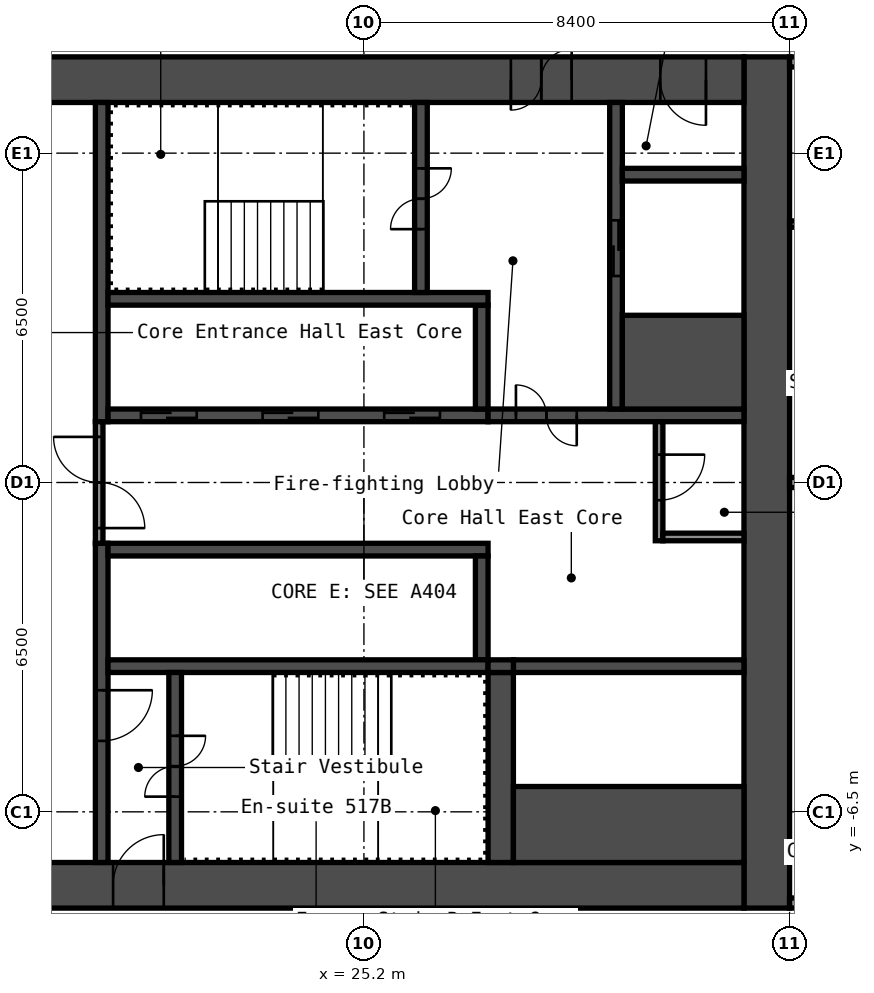
"""IFC4 building model, lengths in metres.
Left out: names, types, materials, properties, quantities, classifications, styles, units other than length and angle.
Written with IfcOpenShell. Run it as: python <this file> out.ifc"""

import sys

from ifc_helpers import new_model, si_unit, direction, frame, frame_2d, origin, place, context, subcontext, project, spatial, rectangle, extrude, element, fill, save


model = new_model("IFC4")
c1 = context("Model", 3, precision=1e-05, world=origin(), true_north=direction((0.0, 1.0)))
c2 = subcontext(c1, "Body", "Model", "MODEL_VIEW")
j1 = project(units=[si_unit("LENGTHUNIT", "METRE"), si_unit("PLANEANGLEUNIT", "RADIAN")], contexts=[c1])
p1 = place(None, origin())
s1 = spatial("IfcSite", under=j1, at=p1, CompositionType="ELEMENT")
p2 = place(p1, origin())
s2 = spatial("IfcBuilding", under=s1, at=p2, CompositionType="ELEMENT")
p3 = place(p2, frame((0.0, 0.0, 23.0)))
s3 = spatial("IfcBuildingStorey", under=s2, at=p3, CompositionType="ELEMENT", Elevation=23.0)
p4 = place(p3, frame((33.15, -8.4, 0.0), z_axis=(0.0, 0.0, 1.0), x_axis=(0.0, 1.0, 0.0)))
e1 = element("IfcWall", 1, at=p4, inside=s3, PredefinedType="SHEAR", context=c2, shape_type="SweptSolid", body=[
    extrude(rectangle(XDim=16.8, YDim=0.9, at=frame_2d((8.4, 0.0))), origin(), (0.0, 0.0, 1.0), 2.8),
])
p5 = place(p3, frame((17.7, 7.95, 0.0), z_axis=(0.0, 0.0, 1.0), x_axis=(1.0, 0.0, 0.0)))
e2 = element("IfcWall", 2, at=p5, inside=s3, PredefinedType="SHEAR", context=c2, shape_type="SweptSolid", body=[
    extrude(rectangle(XDim=15.0, YDim=0.9, at=frame_2d((7.5, 0.0))), origin(), (0.0, 0.0, 1.0), 2.8),
])
p6 = place(p5, frame((10.4, 0.0, 0.0)))
e3 = element("IfcOpeningElement", 3, at=p6, cuts=e2, PredefinedType="OPENING", context=c2, shape_type="SweptSolid", body=[
    extrude(rectangle(XDim=1.2, YDim=2.1, at=frame_2d((0.6, 1.05))), frame((0.0, 0.46, 0.0), z_axis=(0.0, -1.0, 0.0), x_axis=(1.0, 0.0, 0.0)), (0.0, 0.0, 1.0), 0.92),
])
p7 = place(p5, frame((13.35, 0.0, 0.0)))
e4 = element("IfcOpeningElement", 4, at=p7, cuts=e2, PredefinedType="OPENING", context=c2, shape_type="SweptSolid", body=[
    extrude(rectangle(XDim=0.9, YDim=2.1, at=frame_2d((0.45, 1.05))), frame((0.0, 0.46, 0.0), z_axis=(0.0, -1.0, 0.0), x_axis=(1.0, 0.0, 0.0)), (0.0, 0.0, 1.0), 0.92),
])
p8 = place(p3, frame((17.7, -7.95, 0.0), z_axis=(0.0, 0.0, 1.0), x_axis=(1.0, 0.0, 0.0)))
e5 = element("IfcWall", 5, at=p8, inside=s3, PredefinedType="SHEAR", context=c2, shape_type="SweptSolid", body=[
    extrude(rectangle(XDim=15.0, YDim=0.9, at=frame_2d((7.5, 0.0))), origin(), (0.0, 0.0, 1.0), 2.8),
])
p9 = place(p8, frame((2.55, 0.0, 0.0)))
e6 = element("IfcOpeningElement", 6, at=p9, cuts=e5, PredefinedType="OPENING", context=c2, shape_type="SweptSolid", body=[
    extrude(rectangle(XDim=1.0, YDim=2.1, at=frame_2d((0.5, 1.05))), frame((0.0, 0.46, 0.0), z_axis=(0.0, -1.0, 0.0), x_axis=(1.0, 0.0, 0.0)), (0.0, 0.0, 1.0), 0.92),
])
p10 = place(p3, frame((20.025, 1.2, 0.0), z_axis=(0.0, 0.0, 1.0), x_axis=(0.0, 1.0, 0.0)))
e7 = element("IfcWall", 7, at=p10, inside=s3, PredefinedType="SHEAR", context=c2, shape_type="SweptSolid", body=[
    extrude(rectangle(XDim=6.3, YDim=0.25, at=frame_2d((3.15, 0.0))), origin(), (0.0, 0.0, 1.0), 2.8),
])
p11 = place(p3, frame((20.025, -7.5, 0.0), z_axis=(0.0, 0.0, 1.0), x_axis=(0.0, 1.0, 0.0)))
e8 = element("IfcWall", 8, at=p11, inside=s3, PredefinedType="SHEAR", context=c2, shape_type="SweptSolid", body=[
    extrude(rectangle(XDim=6.3, YDim=0.25, at=frame_2d((3.15, 0.0))), origin(), (0.0, 0.0, 1.0), 2.8),
])
p12 = place(p11, frame((2.4, 0.0, 0.0)))
e9 = element("IfcOpeningElement", 9, at=p12, cuts=e8, PredefinedType="OPENING", context=c2, shape_type="SweptSolid", body=[
    extrude(rectangle(XDim=1.0, YDim=2.1, at=frame_2d((0.5, 1.05))), frame((0.0, 0.135, 0.0), z_axis=(0.0, -1.0, 0.0), x_axis=(1.0, 0.0, 0.0)), (0.0, 0.0, 1.0), 0.27),
])
p13 = place(p3, frame((20.15, 1.325, 0.0), z_axis=(0.0, 0.0, 1.0), x_axis=(1.0, 0.0, 0.0)))
e10 = element("IfcWall", 10, at=p13, inside=s3, PredefinedType="SHEAR", context=c2, shape_type="SweptSolid", body=[
    extrude(rectangle(XDim=7.5, YDim=0.25, at=frame_2d((3.75, 0.0))), origin(), (0.0, 0.0, 1.0), 2.8),
])
p14 = place(p13, frame((0.65, 0.0, 0.0)))
e11 = element("IfcOpeningElement", 11, at=p14, cuts=e10, PredefinedType="OPENING", context=c2, shape_type="SweptSolid", body=[
    extrude(rectangle(XDim=1.1, YDim=2.1, at=frame_2d((0.55, 1.05))), frame((0.0, 0.135, 0.0), z_axis=(0.0, -1.0, 0.0), x_axis=(1.0, 0.0, 0.0)), (0.0, 0.0, 1.0), 0.27),
])
p15 = place(p13, frame((3.05, 0.0, 0.0)))
e12 = element("IfcOpeningElement", 12, at=p15, cuts=e10, PredefinedType="OPENING", context=c2, shape_type="SweptSolid", body=[
    extrude(rectangle(XDim=1.1, YDim=2.1, at=frame_2d((0.55, 1.05))), frame((0.0, 0.135, 0.0), z_axis=(0.0, -1.0, 0.0), x_axis=(1.0, 0.0, 0.0)), (0.0, 0.0, 1.0), 0.27),
])
p16 = place(p13, frame((5.45, 0.0, 0.0)))
e13 = element("IfcOpeningElement", 13, at=p16, cuts=e10, PredefinedType="OPENING", context=c2, shape_type="SweptSolid", body=[
    extrude(rectangle(XDim=1.1, YDim=2.1, at=frame_2d((0.55, 1.05))), frame((0.0, 0.135, 0.0), z_axis=(0.0, -1.0, 0.0), x_axis=(1.0, 0.0, 0.0)), (0.0, 0.0, 1.0), 0.27),
])
p17 = place(p3, frame((27.525, 1.45, 0.0), z_axis=(0.0, 0.0, 1.0), x_axis=(0.0, 1.0, 0.0)))
e14 = element("IfcWall", 14, at=p17, inside=s3, PredefinedType="SHEAR", context=c2, shape_type="SweptSolid", body=[
    extrude(rectangle(XDim=2.05, YDim=0.25, at=frame_2d((1.025, 0.0))), origin(), (0.0, 0.0, 1.0), 2.8),
])
p18 = place(p3, frame((20.15, 3.625, 0.0), z_axis=(0.0, 0.0, 1.0), x_axis=(1.0, 0.0, 0.0)))
e15 = element("IfcWall", 15, at=p18, inside=s3, PredefinedType="SHEAR", context=c2, shape_type="SweptSolid", body=[
    extrude(rectangle(XDim=7.5, YDim=0.25, at=frame_2d((3.75, 0.0))), origin(), (0.0, 0.0, 1.0), 2.8),
])
p19 = place(p3, frame((26.325, 3.75, 0.0), z_axis=(0.0, 0.0, 1.0), x_axis=(0.0, 1.0, 0.0)))
e16 = element("IfcWall", 16, at=p19, inside=s3, PredefinedType="SHEAR", context=c2, shape_type="SweptSolid", body=[
    extrude(rectangle(XDim=3.75, YDim=0.25, at=frame_2d((1.875, 0.0))), origin(), (0.0, 0.0, 1.0), 2.8),
])
p20 = place(p19, frame((1.25, 0.0, 0.0)))
e17 = element("IfcOpeningElement", 17, at=p20, cuts=e16, PredefinedType="OPENING", context=c2, shape_type="SweptSolid", body=[
    extrude(rectangle(XDim=1.2, YDim=2.1, at=frame_2d((0.6, 1.05))), frame((0.0, 0.135, 0.0), z_axis=(0.0, -1.0, 0.0), x_axis=(1.0, 0.0, 0.0)), (0.0, 0.0, 1.0), 0.27),
])
p21 = place(p3, frame((27.65, 1.325, 0.0), z_axis=(0.0, 0.0, 1.0), x_axis=(1.0, 0.0, 0.0)))
e18 = element("IfcWall", 18, at=p21, inside=s3, PredefinedType="SHEAR", context=c2, shape_type="SweptSolid", body=[
    extrude(rectangle(XDim=5.05, YDim=0.25, at=frame_2d((2.525, 0.0))), origin(), (0.0, 0.0, 1.0), 2.8),
])
p22 = place(p21, frame((0.55, 0.0, 0.0)))
e19 = element("IfcOpeningElement", 19, at=p22, cuts=e18, PredefinedType="OPENING", context=c2, shape_type="SweptSolid", body=[
    extrude(rectangle(XDim=1.2, YDim=2.1, at=frame_2d((0.6, 1.05))), frame((0.0, 0.135, 0.0), z_axis=(0.0, -1.0, 0.0), x_axis=(1.0, 0.0, 0.0)), (0.0, 0.0, 1.0), 0.27),
])
p23 = place(p3, frame((30.175, 1.45, 0.0), z_axis=(0.0, 0.0, 1.0), x_axis=(0.0, 1.0, 0.0)))
e20 = element("IfcWall", 20, at=p23, inside=s3, PredefinedType="SHEAR", context=c2, shape_type="SweptSolid", body=[
    extrude(rectangle(XDim=6.05, YDim=0.25, at=frame_2d((3.025, 0.0))), origin(), (0.0, 0.0, 1.0), 2.8),
])
p24 = place(p23, frame((2.625, 0.0, 0.0)))
e21 = element("IfcOpeningElement", 21, at=p24, cuts=e20, PredefinedType="OPENING", context=c2, shape_type="SweptSolid", body=[
    extrude(rectangle(XDim=1.1, YDim=2.1, at=frame_2d((0.55, 1.05))), frame((0.0, 0.135, 0.0), z_axis=(0.0, -1.0, 0.0), x_axis=(1.0, 0.0, 0.0)), (0.0, 0.0, 1.0), 0.27),
])
p25 = place(p3, frame((30.3, 2.375, 0.0), z_axis=(0.0, 0.0, 1.0), x_axis=(1.0, 0.0, 0.0)))
e22 = element("IfcWall", 22, at=p25, inside=s3, PredefinedType="SHEAR", context=c2, shape_type="SweptSolid", body=[
    extrude(rectangle(XDim=2.4, YDim=1.85, at=frame_2d((1.2, 0.0))), origin(), (0.0, 0.0, 1.0), 2.8),
])
p26 = place(p3, frame((30.3, 6.075, 0.0), z_axis=(0.0, 0.0, 1.0), x_axis=(1.0, 0.0, 0.0)))
e23 = element("IfcWall", 23, at=p26, inside=s3, PredefinedType="SHEAR", context=c2, shape_type="SweptSolid", body=[
    extrude(rectangle(XDim=2.4, YDim=0.25, at=frame_2d((1.2, 0.0))), origin(), (0.0, 0.0, 1.0), 2.8),
])
p27 = place(p3, frame((20.15, -1.325, 0.0), z_axis=(0.0, 0.0, 1.0), x_axis=(1.0, 0.0, 0.0)))
e24 = element("IfcWall", 24, at=p27, inside=s3, PredefinedType="SHEAR", context=c2, shape_type="SweptSolid", body=[
    extrude(rectangle(XDim=7.5, YDim=0.25, at=frame_2d((3.75, 0.0))), origin(), (0.0, 0.0, 1.0), 2.8),
])
p28 = place(p3, frame((27.525, -3.5, 0.0), z_axis=(0.0, 0.0, 1.0), x_axis=(0.0, 1.0, 0.0)))
e25 = element("IfcWall", 25, at=p28, inside=s3, PredefinedType="SHEAR", context=c2, shape_type="SweptSolid", body=[
    extrude(rectangle(XDim=2.05, YDim=0.25, at=frame_2d((1.025, 0.0))), origin(), (0.0, 0.0, 1.0), 2.8),
])
p29 = place(p3, frame((20.15, -3.625, 0.0), z_axis=(0.0, 0.0, 1.0), x_axis=(1.0, 0.0, 0.0)))
e26 = element("IfcWall", 26, at=p29, inside=s3, PredefinedType="SHEAR", context=c2, shape_type="SweptSolid", body=[
    extrude(rectangle(XDim=7.5, YDim=0.25, at=frame_2d((3.75, 0.0))), origin(), (0.0, 0.0, 1.0), 2.8),
])
p30 = place(p3, frame((21.475, -7.5, 0.0), z_axis=(0.0, 0.0, 1.0), x_axis=(0.0, 1.0, 0.0)))
e27 = element("IfcWall", 27, at=p30, inside=s3, PredefinedType="SHEAR", context=c2, shape_type="SweptSolid", body=[
    extrude(rectangle(XDim=3.75, YDim=0.25, at=frame_2d((1.875, 0.0))), origin(), (0.0, 0.0, 1.0), 2.8),
])
p31 = place(p30, frame((1.3, 0.0, 0.0)))
e28 = element("IfcOpeningElement", 28, at=p31, cuts=e27, PredefinedType="OPENING", context=c2, shape_type="SweptSolid", body=[
    extrude(rectangle(XDim=1.2, YDim=2.1, at=frame_2d((0.6, 1.05))), frame((0.0, 0.135, 0.0), z_axis=(0.0, -1.0, 0.0), x_axis=(1.0, 0.0, 0.0)), (0.0, 0.0, 1.0), 0.27),
])
p32 = place(p3, frame((27.9, -7.5, 0.0), z_axis=(0.0, 0.0, 1.0), x_axis=(0.0, 1.0, 0.0)))
e29 = element("IfcWall", 29, at=p32, inside=s3, PredefinedType="SHEAR", context=c2, shape_type="SweptSolid", body=[
    extrude(rectangle(XDim=3.75, YDim=0.5, at=frame_2d((1.875, 0.0))), origin(), (0.0, 0.0, 1.0), 2.8),
])
p33 = place(p3, frame((28.15, -3.625, 0.0), z_axis=(0.0, 0.0, 1.0), x_axis=(1.0, 0.0, 0.0)))
e30 = element("IfcWall", 30, at=p33, inside=s3, PredefinedType="SHEAR", context=c2, shape_type="SweptSolid", body=[
    extrude(rectangle(XDim=4.55, YDim=0.25, at=frame_2d((2.275, 0.0))), origin(), (0.0, 0.0, 1.0), 2.8),
])
p34 = place(p3, frame((28.15, -6.75, 0.0), z_axis=(0.0, 0.0, 1.0), x_axis=(1.0, 0.0, 0.0)))
e31 = element("IfcWall", 31, at=p34, inside=s3, PredefinedType="SHEAR", context=c2, shape_type="SweptSolid", body=[
    extrude(rectangle(XDim=4.55, YDim=1.5, at=frame_2d((2.275, 0.0))), origin(), (0.0, 0.0, 1.0), 2.8),
])
p35 = place(p3, frame((27.65, -3.625, 0.0), z_axis=(0.0, 0.0, 1.0), x_axis=(1.0, 0.0, 0.0)))
e32 = element("IfcWall", 32, at=p35, inside=s3, PredefinedType="SHEAR", context=c2, shape_type="SweptSolid", body=[
    extrude(rectangle(XDim=0.5, YDim=0.25, at=frame_2d((0.25, 0.0))), origin(), (0.0, 0.0, 1.0), 2.8),
])
p36 = place(p3, frame((19.975, -1.2, 0.0), z_axis=(0.0, 0.0, 1.0), x_axis=(0.0, 1.0, 0.0)))
e33 = element("IfcWall", 33, at=p36, inside=s3, PredefinedType="PARTITIONING", context=c2, shape_type="SweptSolid", body=[
    extrude(rectangle(XDim=2.4, YDim=0.15, at=frame_2d((1.2, 0.0))), origin(), (0.0, 0.0, 1.0), 2.8),
])
p37 = place(p36, frame((0.3, 0.0, 0.0)))
e34 = element("IfcOpeningElement", 34, at=p37, cuts=e33, PredefinedType="OPENING", context=c2, shape_type="SweptSolid", body=[
    extrude(rectangle(XDim=1.8, YDim=2.1, at=frame_2d((0.9, 1.05))), frame((0.0, 0.085, 0.0), z_axis=(0.0, -1.0, 0.0), x_axis=(1.0, 0.0, 0.0)), (0.0, 0.0, 1.0), 0.17),
])
p38 = place(p3, frame((31.025, -1.15, 0.0), z_axis=(0.0, 0.0, 1.0), x_axis=(0.0, 1.0, 0.0)))
e35 = element("IfcWall", 35, at=p38, inside=s3, PredefinedType="PARTITIONING", context=c2, shape_type="SweptSolid", body=[
    extrude(rectangle(XDim=2.35, YDim=0.15, at=frame_2d((1.175, 0.0))), origin(), (0.0, 0.0, 1.0), 2.8),
])
p39 = place(p38, frame((0.8, 0.0, 0.0)))
e36 = element("IfcOpeningElement", 36, at=p39, cuts=e35, PredefinedType="OPENING", context=c2, shape_type="SweptSolid", body=[
    extrude(rectangle(XDim=0.9, YDim=2.1, at=frame_2d((0.45, 1.05))), frame((0.0, 0.085, 0.0), z_axis=(0.0, -1.0, 0.0), x_axis=(1.0, 0.0, 0.0)), (0.0, 0.0, 1.0), 0.17),
])
p40 = place(p3, frame((31.1, -1.075, 0.0), z_axis=(0.0, 0.0, 1.0), x_axis=(1.0, 0.0, 0.0)))
e37 = element("IfcWall", 37, at=p40, inside=s3, PredefinedType="PARTITIONING", context=c2, shape_type="SweptSolid", body=[
    extrude(rectangle(XDim=1.6, YDim=0.15, at=frame_2d((0.8, 0.0))), origin(), (0.0, 0.0, 1.0), 2.8),
])
p41 = place(p3, frame((33.6, -8.3, 0.0), z_axis=(0.0, 0.0, 1.0), x_axis=(1.0, 0.0, 0.0)))
e38 = element("IfcWall", 38, at=p41, inside=s3, PredefinedType="PARTITIONING", context=c2, shape_type="SweptSolid", body=[
    extrude(rectangle(XDim=15.0, YDim=0.2, at=frame_2d((7.5, 0.0))), origin(), (0.0, 0.0, 1.0), 2.8),
])
p42 = place(p41, frame((3.85, 0.0, 0.0)))
e39 = element("IfcOpeningElement", 39, at=p42, cuts=e38, PredefinedType="OPENING", context=c2, shape_type="SweptSolid", body=[
    extrude(rectangle(XDim=1.6, YDim=2.1, at=frame_2d((0.8, 1.05))), frame((0.0, 0.11, 0.0), z_axis=(0.0, -1.0, 0.0), x_axis=(1.0, 0.0, 0.0)), (0.0, 0.0, 1.0), 0.22),
])
p43 = place(p3, frame((33.6, 0.0, 0.0), z_axis=(0.0, 0.0, 1.0), x_axis=(1.0, 0.0, 0.0)))
e40 = element("IfcWall", 40, at=p43, inside=s3, PredefinedType="PARTITIONING", context=c2, shape_type="SweptSolid", body=[
    extrude(rectangle(XDim=14.9, YDim=0.2, at=frame_2d((7.45, 0.0))), origin(), (0.0, 0.0, 1.0), 2.8),
])
p44 = place(p3, frame((33.6, 5.1, 0.0), z_axis=(0.0, 0.0, 1.0), x_axis=(1.0, 0.0, 0.0)))
e41 = element("IfcWall", 41, at=p44, inside=s3, PredefinedType="PARTITIONING", context=c2, shape_type="SweptSolid", body=[
    extrude(rectangle(XDim=2.938, YDim=0.125, at=frame_2d((1.469, 0.0))), origin(), (0.0, 0.0, 1.0), 2.8),
])
p45 = place(p44, frame((1.1, 0.0, 0.0)))
e42 = element("IfcOpeningElement", 42, at=p45, cuts=e41, PredefinedType="OPENING", context=c2, shape_type="SweptSolid", body=[
    extrude(rectangle(XDim=0.8, YDim=2.1, at=frame_2d((0.4, 1.05))), frame((0.0, 0.073, 0.0), z_axis=(0.0, -1.0, 0.0), x_axis=(1.0, 0.0, 0.0)), (0.0, 0.0, 1.0), 0.145),
])
p46 = place(p3, frame((33.6, 8.3, 0.0), z_axis=(0.0, 0.0, 1.0), x_axis=(1.0, 0.0, 0.0)))
e43 = element("IfcWall", 43, at=p46, inside=s3, PredefinedType="PARTITIONING", context=c2, shape_type="SweptSolid", body=[
    extrude(rectangle(XDim=15.0, YDim=0.2, at=frame_2d((7.5, 0.0))), origin(), (0.0, 0.0, 1.0), 2.8),
])
p47 = place(p46, frame((5.8, 0.0, 0.0)))
e44 = element("IfcOpeningElement", 44, at=p47, cuts=e43, PredefinedType="OPENING", context=c2, shape_type="SweptSolid", body=[
    extrude(rectangle(XDim=1.0, YDim=2.1, at=frame_2d((0.5, 1.05))), frame((0.0, 0.11, 0.0), z_axis=(0.0, -1.0, 0.0), x_axis=(1.0, 0.0, 0.0)), (0.0, 0.0, 1.0), 0.22),
])
p48 = place(p46, frame((9.5, 0.0, 0.0)))
e45 = element("IfcOpeningElement", 45, at=p48, cuts=e43, PredefinedType="OPENING", context=c2, shape_type="SweptSolid", body=[
    extrude(rectangle(XDim=1.0, YDim=2.1, at=frame_2d((0.5, 1.05))), frame((0.0, 0.11, 0.0), z_axis=(0.0, -1.0, 0.0), x_axis=(1.0, 0.0, 0.0)), (0.0, 0.0, 1.0), 0.22),
])
p49 = place(p6, origin())
e46 = element("IfcDoor", 46, at=p49, inside=s3, OperationType="DOUBLE_DOOR_SINGLE_SWING", PredefinedType="DOOR", context=c2, shape_type="SweptSolid", body=[
    extrude(rectangle(XDim=1.2, YDim=2.1, at=frame_2d((0.6, 1.05))), frame((0.0, 0.025, 0.0), z_axis=(0.0, -1.0, 0.0), x_axis=(1.0, 0.0, 0.0)), (0.0, 0.0, 1.0), 0.05),
])
fill(e3, e46)
p50 = place(p7, origin())
e47 = element("IfcDoor", 47, at=p50, inside=s3, OperationType="SINGLE_SWING_RIGHT", PredefinedType="DOOR", context=c2, shape_type="SweptSolid", body=[
    extrude(rectangle(XDim=0.9, YDim=2.1, at=frame_2d((0.45, 1.05))), frame((0.0, 0.025, 0.0), z_axis=(0.0, -1.0, 0.0), x_axis=(1.0, 0.0, 0.0)), (0.0, 0.0, 1.0), 0.05),
])
fill(e4, e47)
p51 = place(p9, origin())
e48 = element("IfcDoor", 48, at=p51, inside=s3, OperationType="SINGLE_SWING_LEFT", PredefinedType="DOOR", context=c2, shape_type="SweptSolid", body=[
    extrude(rectangle(XDim=1.0, YDim=2.1, at=frame_2d((0.5, 1.05))), frame((0.0, 0.025, 0.0), z_axis=(0.0, -1.0, 0.0), x_axis=(1.0, 0.0, 0.0)), (0.0, 0.0, 1.0), 0.05),
])
fill(e6, e48)
p52 = place(p20, origin())
e49 = element("IfcDoor", 49, at=p52, inside=s3, OperationType="DOUBLE_DOOR_SINGLE_SWING", PredefinedType="DOOR", context=c2, shape_type="SweptSolid", body=[
    extrude(rectangle(XDim=1.2, YDim=2.1, at=frame_2d((0.6, 1.05))), frame((0.0, 0.025, 0.0), z_axis=(0.0, -1.0, 0.0), x_axis=(1.0, 0.0, 0.0)), (0.0, 0.0, 1.0), 0.05),
])
fill(e17, e49)
p53 = place(p31, origin())
e50 = element("IfcDoor", 50, at=p53, inside=s3, OperationType="DOUBLE_DOOR_SINGLE_SWING", PredefinedType="DOOR", context=c2, shape_type="SweptSolid", body=[
    extrude(rectangle(XDim=1.2, YDim=2.1, at=frame_2d((0.6, 1.05))), frame((0.0, 0.025, 0.0), z_axis=(0.0, -1.0, 0.0), x_axis=(1.0, 0.0, 0.0)), (0.0, 0.0, 1.0), 0.05),
])
fill(e28, e50)
p54 = place(p12, origin())
e51 = element("IfcDoor", 51, at=p54, inside=s3, OperationType="SINGLE_SWING_RIGHT", PredefinedType="DOOR", context=c2, shape_type="SweptSolid", body=[
    extrude(rectangle(XDim=1.0, YDim=2.1, at=frame_2d((0.5, 1.05))), frame((0.0, 0.025, 0.0), z_axis=(0.0, -1.0, 0.0), x_axis=(1.0, 0.0, 0.0)), (0.0, 0.0, 1.0), 0.05),
])
fill(e9, e51)
p55 = place(p22, origin())
e52 = element("IfcDoor", 52, at=p55, inside=s3, OperationType="DOUBLE_DOOR_SINGLE_SWING", PredefinedType="DOOR", context=c2, shape_type="SweptSolid", body=[
    extrude(rectangle(XDim=1.2, YDim=2.1, at=frame_2d((0.6, 1.05))), frame((0.0, 0.025, 0.0), z_axis=(0.0, -1.0, 0.0), x_axis=(1.0, 0.0, 0.0)), (0.0, 0.0, 1.0), 0.05),
])
fill(e19, e52)
p56 = place(p37, origin())
e53 = element("IfcDoor", 53, at=p56, inside=s3, OperationType="DOUBLE_DOOR_SINGLE_SWING", PredefinedType="DOOR", context=c2, shape_type="SweptSolid", body=[
    extrude(rectangle(XDim=1.8, YDim=2.1, at=frame_2d((0.9, 1.05))), frame((0.0, 0.025, 0.0), z_axis=(0.0, -1.0, 0.0), x_axis=(1.0, 0.0, 0.0)), (0.0, 0.0, 1.0), 0.05),
])
fill(e34, e53)
p57 = place(p39, origin())
e54 = element("IfcDoor", 54, at=p57, inside=s3, OperationType="SINGLE_SWING_RIGHT", PredefinedType="DOOR", context=c2, shape_type="SweptSolid", body=[
    extrude(rectangle(XDim=0.9, YDim=2.1, at=frame_2d((0.45, 1.05))), frame((0.0, 0.025, 0.0), z_axis=(0.0, -1.0, 0.0), x_axis=(1.0, 0.0, 0.0)), (0.0, 0.0, 1.0), 0.05),
])
fill(e36, e54)
p58 = place(p14, origin())
e55 = element("IfcDoor", 55, at=p58, inside=s3, OperationType="DOUBLE_DOOR_SLIDING", PredefinedType="DOOR", context=c2, shape_type="SweptSolid", body=[
    extrude(rectangle(XDim=1.1, YDim=2.1, at=frame_2d((0.55, 1.05))), frame((0.0, 0.025, 0.0), z_axis=(0.0, -1.0, 0.0), x_axis=(1.0, 0.0, 0.0)), (0.0, 0.0, 1.0), 0.05),
])
fill(e11, e55)
p59 = place(p15, origin())
e56 = element("IfcDoor", 56, at=p59, inside=s3, OperationType="DOUBLE_DOOR_SLIDING", PredefinedType="DOOR", context=c2, shape_type="SweptSolid", body=[
    extrude(rectangle(XDim=1.1, YDim=2.1, at=frame_2d((0.55, 1.05))), frame((0.0, 0.025, 0.0), z_axis=(0.0, -1.0, 0.0), x_axis=(1.0, 0.0, 0.0)), (0.0, 0.0, 1.0), 0.05),
])
fill(e12, e56)
p60 = place(p16, origin())
e57 = element("IfcDoor", 57, at=p60, inside=s3, OperationType="DOUBLE_DOOR_SLIDING", PredefinedType="DOOR", context=c2, shape_type="SweptSolid", body=[
    extrude(rectangle(XDim=1.1, YDim=2.1, at=frame_2d((0.55, 1.05))), frame((0.0, 0.025, 0.0), z_axis=(0.0, -1.0, 0.0), x_axis=(1.0, 0.0, 0.0)), (0.0, 0.0, 1.0), 0.05),
])
fill(e13, e57)
p61 = place(p24, origin())
e58 = element("IfcDoor", 58, at=p61, inside=s3, OperationType="DOUBLE_DOOR_SLIDING", PredefinedType="DOOR", context=c2, shape_type="SweptSolid", body=[
    extrude(rectangle(XDim=1.1, YDim=2.1, at=frame_2d((0.55, 1.05))), frame((0.0, 0.025, 0.0), z_axis=(0.0, -1.0, 0.0), x_axis=(1.0, 0.0, 0.0)), (0.0, 0.0, 1.0), 0.05),
])
fill(e21, e58)
save(model, sys.argv[1])
